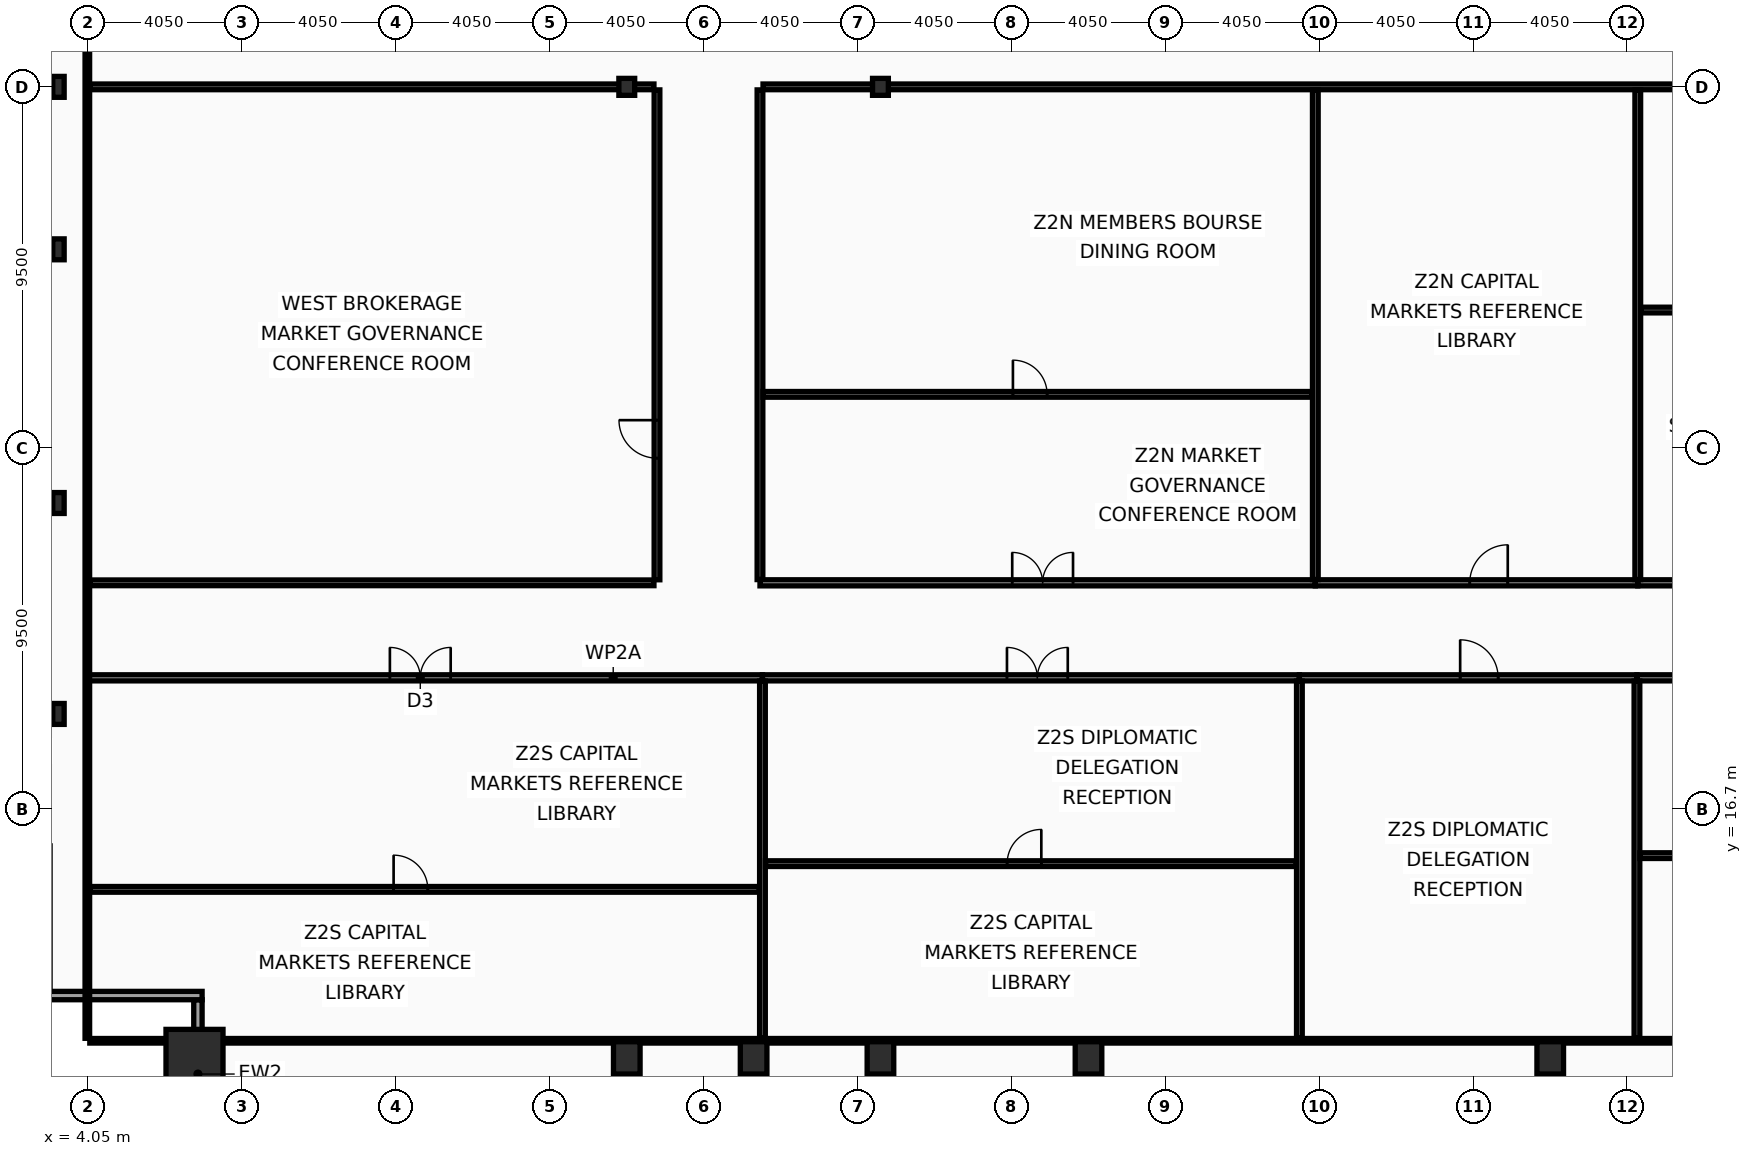
"""IFC4 building model, lengths in metres.
Left out: names, types, materials, properties, quantities, classifications, styles, units other than length and angle.
Written with IfcOpenShell. Run it as: python <this file> out.ifc"""

import sys

from ifc_helpers import new_model, si_unit, direction, frame, frame_2d, origin, origin_2d, place, context, subcontext, project, spatial, rectangle, hollow_rectangle, i_section, extrude, element, fill, save


model = new_model("IFC4")
c1 = context("Model", 3, precision=1e-05, world=origin(), true_north=direction((0.0, 1.0)))
c2 = subcontext(c1, "Body", "Model", "MODEL_VIEW")
j1 = project(units=[si_unit("LENGTHUNIT", "METRE"), si_unit("PLANEANGLEUNIT", "RADIAN")], contexts=[c1])
p1 = place(None, origin())
s1 = spatial("IfcSite", under=j1, at=p1, CompositionType="ELEMENT")
p2 = place(p1, origin())
s2 = spatial("IfcBuilding", under=s1, at=p2, CompositionType="ELEMENT")
p3 = place(p2, frame((0.0, 0.0, 118.2)))
s3 = spatial("IfcBuildingStorey", under=s2, at=p3, CompositionType="ELEMENT", Elevation=118.2)
p4 = place(p3, frame((6.85, 10.15, 0.0), z_axis=(0.0, 0.0, 1.0), x_axis=(1.0, 0.0, 0.0)))
e1 = element("IfcColumn", 1, at=p4, inside=s3, PredefinedType="COLUMN", context=c2, shape_type="SweptSolid", body=[
    extrude(hollow_rectangle(XDim=1.5, YDim=1.5, WallThickness=0.07, at=origin_2d()), origin(), (0.0, 0.0, 1.0), 3.6),
])
for number, where, z_axis, x_axis in (
    (2, (18.225, 10.15, 0.0), (0.0, 0.0, 1.0), (1.0, 0.0, 0.0)),
    (3, (21.562, 10.15, 0.0), (0.0, 0.0, 1.0), (1.0, 0.0, 0.0)),
    (4, (24.9, 10.15, 0.0), (0.0, 0.0, 1.0), (1.0, 0.0, 0.0)),
    (5, (30.375, 10.15, 0.0), (0.0, 0.0, 1.0), (1.0, 0.0, 0.0)),
    (6, (42.525, 10.15, 0.0), (0.0, 0.0, 1.0), (1.0, 0.0, 0.0)),
):
    element("IfcColumn", number, at=place(p3, frame(where, z_axis=z_axis, x_axis=x_axis)), inside=s3, PredefinedType="COLUMN", context=c2, shape_type="SweptSolid", body=[
        extrude(hollow_rectangle(XDim=0.7, YDim=0.85, WallThickness=0.05, at=origin_2d()), origin(), (0.0, 0.0, 1.0), 3.6),
    ])
for number, where, z_axis, x_axis in (
    (7, (3.27, 19.2, 0.0), (0.0, 0.0, 1.0), (1.0, 0.0, 0.0)),
    (8, (3.27, 24.75, 0.0), (0.0, 0.0, 1.0), (1.0, 0.0, 0.0)),
    (9, (3.27, 31.425, 0.0), (0.0, 0.0, 1.0), (1.0, 0.0, 0.0)),
    (10, (3.27, 35.7, 0.0), (0.0, 0.0, 1.0), (1.0, 0.0, 0.0)),
):
    element("IfcColumn", number, at=place(p3, frame(where, z_axis=z_axis, x_axis=x_axis)), inside=s3, PredefinedType="COLUMN", context=c2, shape_type="SweptSolid", body=[
        extrude(i_section(OverallWidth=0.3, OverallDepth=0.55, WebThickness=0.015, FlangeThickness=0.029, at=origin_2d()), origin(), (0.0, 0.0, 1.0), 3.6),
    ])
for number, where, z_axis, x_axis in (
    (11, (18.225, 35.7, 0.0), (0.0, 0.0, 1.0), (1.0, 0.0, 0.0)),
    (12, (24.9, 35.7, 0.0), (0.0, 0.0, 1.0), (1.0, 0.0, 0.0)),
):
    element("IfcColumn", number, at=place(p3, frame(where, z_axis=z_axis, x_axis=x_axis)), inside=s3, PredefinedType="COLUMN", context=c2, shape_type="SweptSolid", body=[
        extrude(i_section(OverallWidth=0.416, OverallDepth=0.446, WebThickness=0.039, FlangeThickness=0.063, at=origin_2d()), origin(), (0.0, 0.0, 1.0), 3.6),
    ])
p5 = place(p3, frame((6.94, 7.77, 0.0), z_axis=(0.0, 0.0, 1.0), x_axis=(0.0, 1.0, 0.0)))
e13 = element("IfcWall", 13, at=p5, inside=s3, PredefinedType="SOLIDWALL", context=c2, shape_type="SweptSolid", body=[
    extrude(rectangle(XDim=3.91, YDim=0.22, at=frame_2d((1.955, 0.0))), origin(), (0.0, 0.0, 1.0), 2.83),
])
p6 = place(p3, frame((7.05, 11.79, 0.0), z_axis=(0.0, 0.0, 1.0), x_axis=(-1.0, 0.0, 0.0)))
e14 = element("IfcWall", 14, at=p6, inside=s3, PredefinedType="SOLIDWALL", context=c2, shape_type="SweptSolid", body=[
    extrude(rectangle(XDim=4.22, YDim=0.22, at=frame_2d((2.11, 0.0))), origin(), (0.0, 0.0, 1.0), 2.83),
])
p7 = place(p3, frame((4.03, 20.15, 0.0), z_axis=(0.0, 0.0, 1.0), x_axis=(1.0, 0.0, 0.0)))
e15 = element("IfcWall", 15, at=p7, inside=s3, PredefinedType="PARTITIONING", context=c2, shape_type="SweptSolid", body=[
    extrude(rectangle(XDim=17.765, YDim=0.16, at=frame_2d((8.883, 0.0))), origin(), (0.0, 0.0, 1.0), 2.73),
])
p8 = place(p7, frame((7.961, 0.0, 0.0)))
e16 = element("IfcOpeningElement", 16, at=p8, cuts=e15, PredefinedType="OPENING", context=c2, shape_type="SweptSolid", body=[
    extrude(rectangle(XDim=1.6, YDim=2.15, at=frame_2d((0.8, 1.075))), frame((0.0, 0.09, 0.0), z_axis=(0.0, -1.0, 0.0), x_axis=(1.0, 0.0, 0.0)), (0.0, 0.0, 1.0), 0.18),
])
p9 = place(p3, frame((4.095, 14.584, 0.0), z_axis=(0.0, 0.0, 1.0), x_axis=(1.0, 0.0, 0.0)))
e17 = element("IfcWall", 17, at=p9, inside=s3, PredefinedType="PARTITIONING", context=c2, shape_type="SweptSolid", body=[
    extrude(rectangle(XDim=17.62, YDim=0.15, at=frame_2d((8.81, 0.0))), origin(), (0.0, 0.0, 1.0), 2.73),
])
p10 = place(p9, frame((7.994, 0.0, 0.0)))
e18 = element("IfcOpeningElement", 18, at=p10, cuts=e17, PredefinedType="OPENING", context=c2, shape_type="SweptSolid", body=[
    extrude(rectangle(XDim=0.9, YDim=2.05, at=frame_2d((0.45, 1.025))), frame((0.0, 0.085, 0.0), z_axis=(0.0, -1.0, 0.0), x_axis=(1.0, 0.0, 0.0)), (0.0, 0.0, 1.0), 0.17),
])
p11 = place(p3, frame((21.795, 20.15, 0.0), z_axis=(0.0, 0.0, 1.0), x_axis=(1.0, 0.0, 0.0)))
e19 = element("IfcWall", 19, at=p11, inside=s3, PredefinedType="PARTITIONING", context=c2, shape_type="SweptSolid", body=[
    extrude(rectangle(XDim=14.129, YDim=0.16, at=frame_2d((7.064, 0.0))), origin(), (0.0, 0.0, 1.0), 2.73),
])
p12 = place(p11, frame((6.434, 0.0, 0.0)))
e20 = element("IfcOpeningElement", 20, at=p12, cuts=e19, PredefinedType="OPENING", context=c2, shape_type="SweptSolid", body=[
    extrude(rectangle(XDim=1.6, YDim=2.15, at=frame_2d((0.8, 1.075))), frame((0.0, 0.09, 0.0), z_axis=(0.0, -1.0, 0.0), x_axis=(1.0, 0.0, 0.0)), (0.0, 0.0, 1.0), 0.18),
])
p13 = place(p3, frame((21.795, 10.665, 0.0), z_axis=(0.0, 0.0, 1.0), x_axis=(0.0, 1.0, 0.0)))
e21 = element("IfcWall", 21, at=p13, inside=s3, PredefinedType="PARTITIONING", context=c2, shape_type="SweptSolid", body=[
    extrude(rectangle(XDim=9.4, YDim=0.15, at=frame_2d((4.7, 0.0))), origin(), (0.0, 0.0, 1.0), 2.88),
])
p14 = place(p3, frame((21.875, 15.261, 0.0), z_axis=(0.0, 0.0, 1.0), x_axis=(1.0, 0.0, 0.0)))
e22 = element("IfcWall", 22, at=p14, inside=s3, PredefinedType="PARTITIONING", context=c2, shape_type="SweptSolid", body=[
    extrude(rectangle(XDim=13.969, YDim=0.15, at=frame_2d((6.984, 0.0))), origin(), (0.0, 0.0, 1.0), 2.73),
])
p15 = place(p14, frame((6.358, 0.0, 0.0)))
e23 = element("IfcOpeningElement", 23, at=p15, cuts=e22, PredefinedType="OPENING", context=c2, shape_type="SweptSolid", body=[
    extrude(rectangle(XDim=0.9, YDim=2.05, at=frame_2d((0.45, 1.025))), frame((0.0, 0.085, 0.0), z_axis=(0.0, -1.0, 0.0), x_axis=(1.0, 0.0, 0.0)), (0.0, 0.0, 1.0), 0.17),
])
p16 = place(p3, frame((35.924, 20.15, 0.0), z_axis=(0.0, 0.0, 1.0), x_axis=(1.0, 0.0, 0.0)))
e24 = element("IfcWall", 24, at=p16, inside=s3, PredefinedType="PARTITIONING", context=c2, shape_type="SweptSolid", body=[
    extrude(rectangle(XDim=8.883, YDim=0.16, at=frame_2d((4.441, 0.0))), origin(), (0.0, 0.0, 1.0), 2.73),
])
p17 = place(p16, frame((4.231, 0.0, 0.0)))
e25 = element("IfcOpeningElement", 25, at=p17, cuts=e24, PredefinedType="OPENING", context=c2, shape_type="SweptSolid", body=[
    extrude(rectangle(XDim=1.0, YDim=2.05, at=frame_2d((0.5, 1.025))), frame((0.0, 0.09, 0.0), z_axis=(0.0, -1.0, 0.0), x_axis=(1.0, 0.0, 0.0)), (0.0, 0.0, 1.0), 0.18),
])
p18 = place(p3, frame((35.924, 10.665, 0.0), z_axis=(0.0, 0.0, 1.0), x_axis=(0.0, 1.0, 0.0)))
e26 = element("IfcWall", 26, at=p18, inside=s3, PredefinedType="PARTITIONING", context=c2, shape_type="SweptSolid", body=[
    extrude(rectangle(XDim=9.4, YDim=0.15, at=frame_2d((4.7, 0.0))), origin(), (0.0, 0.0, 1.0), 2.88),
])
p19 = place(p3, frame((44.807, 20.15, 0.0), z_axis=(0.0, 0.0, 1.0), x_axis=(1.0, 0.0, 0.0)))
e27 = element("IfcWall", 27, at=p19, inside=s3, PredefinedType="PARTITIONING", context=c2, shape_type="SweptSolid", body=[
    extrude(rectangle(XDim=11.727, YDim=0.16, at=frame_2d((5.863, 0.0))), origin(), (0.0, 0.0, 1.0), 2.73),
])
p20 = place(p19, frame((5.425, 0.0, 0.0)))
e28 = element("IfcOpeningElement", 28, at=p20, cuts=e27, PredefinedType="OPENING", context=c2, shape_type="SweptSolid", body=[
    extrude(rectangle(XDim=1.0, YDim=2.05, at=frame_2d((0.5, 1.025))), frame((0.0, 0.09, 0.0), z_axis=(0.0, -1.0, 0.0), x_axis=(1.0, 0.0, 0.0)), (0.0, 0.0, 1.0), 0.18),
])
p21 = place(p3, frame((44.807, 10.665, 0.0), z_axis=(0.0, 0.0, 1.0), x_axis=(0.0, 1.0, 0.0)))
e29 = element("IfcWall", 29, at=p21, inside=s3, PredefinedType="PARTITIONING", context=c2, shape_type="SweptSolid", body=[
    extrude(rectangle(XDim=9.4, YDim=0.15, at=frame_2d((4.7, 0.0))), origin(), (0.0, 0.0, 1.0), 2.88),
])
p22 = place(p3, frame((44.887, 15.472, 0.0), z_axis=(0.0, 0.0, 1.0), x_axis=(1.0, 0.0, 0.0)))
e30 = element("IfcWall", 30, at=p22, inside=s3, PredefinedType="PARTITIONING", context=c2, shape_type="SweptSolid", body=[
    extrude(rectangle(XDim=11.566, YDim=0.15, at=frame_2d((5.783, 0.0))), origin(), (0.0, 0.0, 1.0), 2.73),
])
p23 = place(p22, frame((5.277, 0.0, 0.0)))
e31 = element("IfcOpeningElement", 31, at=p23, cuts=e30, PredefinedType="OPENING", context=c2, shape_type="SweptSolid", body=[
    extrude(rectangle(XDim=0.9, YDim=2.05, at=frame_2d((0.45, 1.025))), frame((0.0, 0.085, 0.0), z_axis=(0.0, -1.0, 0.0), x_axis=(1.0, 0.0, 0.0)), (0.0, 0.0, 1.0), 0.17),
])
p24 = place(p3, frame((19.02, 22.73, 0.0), z_axis=(0.0, 0.0, 1.0), x_axis=(0.0, 1.0, 0.0)))
e32 = element("IfcWall", 32, at=p24, inside=s3, PredefinedType="PARTITIONING", context=c2, shape_type="SweptSolid", body=[
    extrude(rectangle(XDim=12.89, YDim=0.15, at=frame_2d((6.445, 0.0))), origin(), (0.0, 0.0, 1.0), 2.88),
])
p25 = place(p24, frame((3.2, 0.0, 0.0)))
e33 = element("IfcOpeningElement", 33, at=p25, cuts=e32, PredefinedType="OPENING", context=c2, shape_type="SweptSolid", body=[
    extrude(rectangle(XDim=1.0, YDim=2.05, at=frame_2d((0.5, 1.025))), frame((0.0, 0.085, 0.0), z_axis=(0.0, -1.0, 0.0), x_axis=(1.0, 0.0, 0.0)), (0.0, 0.0, 1.0), 0.17),
])
for number, where, z_axis, x_axis in (
    (34, (4.095, 22.65, 0.0), (0.0, 0.0, 1.0), (1.0, 0.0, 0.0)),
    (35, (4.095, 35.7, 0.0), (0.0, 0.0, 1.0), (1.0, 0.0, 0.0)),
):
    element("IfcWall", number, at=place(p3, frame(where, z_axis=z_axis, x_axis=x_axis)), inside=s3, PredefinedType="PARTITIONING", context=c2, shape_type="SweptSolid", body=[
        extrude(rectangle(XDim=14.845, YDim=0.15, at=frame_2d((7.422, 0.0))), origin(), (0.0, 0.0, 1.0), 2.73),
    ])
p26 = place(p3, frame((21.73, 22.735, 0.0), z_axis=(0.0, 0.0, 1.0), x_axis=(0.0, 1.0, 0.0)))
e36 = element("IfcWall", 36, at=p26, inside=s3, PredefinedType="PARTITIONING", context=c2, shape_type="SweptSolid", body=[
    extrude(rectangle(XDim=12.885, YDim=0.15, at=frame_2d((6.442, 0.0))), origin(), (0.0, 0.0, 1.0), 2.88),
])
p27 = place(p3, frame((21.81, 35.7, 0.0), z_axis=(0.0, 0.0, 1.0), x_axis=(1.0, 0.0, 0.0)))
e37 = element("IfcWall", 37, at=p27, inside=s3, PredefinedType="PARTITIONING", context=c2, shape_type="SweptSolid", body=[
    extrude(rectangle(XDim=46.995, YDim=0.15, at=frame_2d((23.498, 0.0))), origin(), (0.0, 0.0, 1.0), 2.73),
])
p28 = place(p3, frame((21.73, 22.65, 0.0), z_axis=(0.0, 0.0, 1.0), x_axis=(1.0, 0.0, 0.0)))
e38 = element("IfcWall", 38, at=p28, inside=s3, PredefinedType="PARTITIONING", context=c2, shape_type="SweptSolid", body=[
    extrude(rectangle(XDim=14.614, YDim=0.16, at=frame_2d((7.307, 0.0))), origin(), (0.0, 0.0, 1.0), 2.73),
])
p29 = place(p28, frame((6.638, 0.0, 0.0)))
e39 = element("IfcOpeningElement", 39, at=p29, cuts=e38, PredefinedType="OPENING", context=c2, shape_type="SweptSolid", body=[
    extrude(rectangle(XDim=1.6, YDim=2.15, at=frame_2d((0.8, 1.075))), frame((0.0, 0.09, 0.0), z_axis=(0.0, -1.0, 0.0), x_axis=(1.0, 0.0, 0.0)), (0.0, 0.0, 1.0), 0.18),
])
p30 = place(p3, frame((21.81, 27.609, 0.0), z_axis=(0.0, 0.0, 1.0), x_axis=(1.0, 0.0, 0.0)))
e40 = element("IfcWall", 40, at=p30, inside=s3, PredefinedType="PARTITIONING", context=c2, shape_type="SweptSolid", body=[
    extrude(rectangle(XDim=14.453, YDim=0.15, at=frame_2d((7.227, 0.0))), origin(), (0.0, 0.0, 1.0), 2.73),
])
p31 = place(p30, frame((6.576, 0.0, 0.0)))
e41 = element("IfcOpeningElement", 41, at=p31, cuts=e40, PredefinedType="OPENING", context=c2, shape_type="SweptSolid", body=[
    extrude(rectangle(XDim=0.9, YDim=2.05, at=frame_2d((0.45, 1.025))), frame((0.0, 0.085, 0.0), z_axis=(0.0, -1.0, 0.0), x_axis=(1.0, 0.0, 0.0)), (0.0, 0.0, 1.0), 0.17),
])
p32 = place(p3, frame((36.344, 22.65, 0.0), z_axis=(0.0, 0.0, 1.0), x_axis=(1.0, 0.0, 0.0)))
e42 = element("IfcWall", 42, at=p32, inside=s3, PredefinedType="PARTITIONING", context=c2, shape_type="SweptSolid", body=[
    extrude(rectangle(XDim=8.485, YDim=0.16, at=frame_2d((4.243, 0.0))), origin(), (0.0, 0.0, 1.0), 2.73),
])
p33 = place(p32, frame((4.064, 0.0, 0.0)))
e43 = element("IfcOpeningElement", 43, at=p33, cuts=e42, PredefinedType="OPENING", context=c2, shape_type="SweptSolid", body=[
    extrude(rectangle(XDim=1.0, YDim=2.05, at=frame_2d((0.5, 1.025))), frame((0.0, 0.09, 0.0), z_axis=(0.0, -1.0, 0.0), x_axis=(1.0, 0.0, 0.0)), (0.0, 0.0, 1.0), 0.18),
])
p34 = place(p3, frame((36.344, 22.735, 0.0), z_axis=(0.0, 0.0, 1.0), x_axis=(0.0, 1.0, 0.0)))
e44 = element("IfcWall", 44, at=p34, inside=s3, PredefinedType="PARTITIONING", context=c2, shape_type="SweptSolid", body=[
    extrude(rectangle(XDim=12.885, YDim=0.15, at=frame_2d((6.442, 0.0))), origin(), (0.0, 0.0, 1.0), 2.88),
])
p35 = place(p3, frame((44.829, 22.65, 0.0), z_axis=(0.0, 0.0, 1.0), x_axis=(1.0, 0.0, 0.0)))
e45 = element("IfcWall", 45, at=p35, inside=s3, PredefinedType="PARTITIONING", context=c2, shape_type="SweptSolid", body=[
    extrude(rectangle(XDim=8.014, YDim=0.16, at=frame_2d((4.007, 0.0))), origin(), (0.0, 0.0, 1.0), 2.73),
])
p36 = place(p35, frame((3.866, 0.0, 0.0)))
e46 = element("IfcOpeningElement", 46, at=p36, cuts=e45, PredefinedType="OPENING", context=c2, shape_type="SweptSolid", body=[
    extrude(rectangle(XDim=1.0, YDim=2.05, at=frame_2d((0.5, 1.025))), frame((0.0, 0.09, 0.0), z_axis=(0.0, -1.0, 0.0), x_axis=(1.0, 0.0, 0.0)), (0.0, 0.0, 1.0), 0.18),
])
p37 = place(p3, frame((44.829, 22.735, 0.0), z_axis=(0.0, 0.0, 1.0), x_axis=(0.0, 1.0, 0.0)))
e47 = element("IfcWall", 47, at=p37, inside=s3, PredefinedType="PARTITIONING", context=c2, shape_type="SweptSolid", body=[
    extrude(rectangle(XDim=12.885, YDim=0.15, at=frame_2d((6.442, 0.0))), origin(), (0.0, 0.0, 1.0), 2.88),
])
p38 = place(p3, frame((44.909, 29.827, 0.0), z_axis=(0.0, 0.0, 1.0), x_axis=(1.0, 0.0, 0.0)))
e48 = element("IfcWall", 48, at=p38, inside=s3, PredefinedType="PARTITIONING", context=c2, shape_type="SweptSolid", body=[
    extrude(rectangle(XDim=7.854, YDim=0.15, at=frame_2d((3.927, 0.0))), origin(), (0.0, 0.0, 1.0), 2.73),
])
p39 = place(p38, frame((3.606, 0.0, 0.0)))
e49 = element("IfcOpeningElement", 49, at=p39, cuts=e48, PredefinedType="OPENING", context=c2, shape_type="SweptSolid", body=[
    extrude(rectangle(XDim=0.9, YDim=2.05, at=frame_2d((0.45, 1.025))), frame((0.0, 0.085, 0.0), z_axis=(0.0, -1.0, 0.0), x_axis=(1.0, 0.0, 0.0)), (0.0, 0.0, 1.0), 0.17),
])
p40 = place(p3, frame((4.03, 10.665, 0.0), z_axis=(0.0, 0.0, 1.0), x_axis=(0.0, 1.0, 0.0)))
e50 = element("IfcWall", 50, at=p40, inside=s3, PredefinedType="PARTITIONING", context=c2, shape_type="SweptSolid", body=[
    extrude(rectangle(XDim=42.11, YDim=0.12, at=frame_2d((21.055, 0.0))), origin(), (0.0, 0.0, 1.0), 2.73),
])
p41 = place(p3, frame((4.095, 10.6, 0.0), z_axis=(0.0, 0.0, 1.0), x_axis=(1.0, 0.0, 0.0)))
e51 = element("IfcWall", 51, at=p41, inside=s3, PredefinedType="PARTITIONING", context=c2, shape_type="SweptSolid", body=[
    extrude(rectangle(XDim=64.71, YDim=0.12, at=frame_2d((32.355, 0.0))), origin(), (0.0, 0.0, 1.0), 2.73),
])
p42 = place(p8, origin())
e52 = element("IfcDoor", 52, at=p42, inside=s3, OperationType="DOUBLE_DOOR_SINGLE_SWING", PredefinedType="DOOR", context=c2, shape_type="SweptSolid", body=[
    extrude(rectangle(XDim=1.6, YDim=2.15, at=frame_2d((0.8, 1.075))), frame((0.0, 0.025, 0.0), z_axis=(0.0, -1.0, 0.0), x_axis=(1.0, 0.0, 0.0)), (0.0, 0.0, 1.0), 0.05),
])
fill(e16, e52)
p43 = place(p10, origin())
e53 = element("IfcDoor", 53, at=p43, inside=s3, OperationType="SINGLE_SWING_LEFT", PredefinedType="DOOR", context=c2, shape_type="SweptSolid", body=[
    extrude(rectangle(XDim=0.9, YDim=2.05, at=frame_2d((0.45, 1.025))), frame((0.0, 0.025, 0.0), z_axis=(0.0, -1.0, 0.0), x_axis=(1.0, 0.0, 0.0)), (0.0, 0.0, 1.0), 0.05),
])
fill(e18, e53)
p44 = place(p12, origin())
e54 = element("IfcDoor", 54, at=p44, inside=s3, OperationType="DOUBLE_DOOR_SINGLE_SWING", PredefinedType="DOOR", context=c2, shape_type="SweptSolid", body=[
    extrude(rectangle(XDim=1.6, YDim=2.15, at=frame_2d((0.8, 1.075))), frame((0.0, 0.025, 0.0), z_axis=(0.0, -1.0, 0.0), x_axis=(1.0, 0.0, 0.0)), (0.0, 0.0, 1.0), 0.05),
])
fill(e20, e54)
p45 = place(p15, origin())
e55 = element("IfcDoor", 55, at=p45, inside=s3, OperationType="SINGLE_SWING_RIGHT", PredefinedType="DOOR", context=c2, shape_type="SweptSolid", body=[
    extrude(rectangle(XDim=0.9, YDim=2.05, at=frame_2d((0.45, 1.025))), frame((0.0, 0.025, 0.0), z_axis=(0.0, -1.0, 0.0), x_axis=(1.0, 0.0, 0.0)), (0.0, 0.0, 1.0), 0.05),
])
fill(e23, e55)
p46 = place(p17, origin())
e56 = element("IfcDoor", 56, at=p46, inside=s3, OperationType="SINGLE_SWING_LEFT", PredefinedType="DOOR", context=c2, shape_type="SweptSolid", body=[
    extrude(rectangle(XDim=1.0, YDim=2.05, at=frame_2d((0.5, 1.025))), frame((0.0, 0.025, 0.0), z_axis=(0.0, -1.0, 0.0), x_axis=(1.0, 0.0, 0.0)), (0.0, 0.0, 1.0), 0.05),
])
fill(e25, e56)
p47 = place(p25, origin())
e57 = element("IfcDoor", 57, at=p47, inside=s3, OperationType="SINGLE_SWING_RIGHT", PredefinedType="DOOR", context=c2, shape_type="SweptSolid", body=[
    extrude(rectangle(XDim=1.0, YDim=2.05, at=frame_2d((0.5, 1.025))), frame((0.0, 0.025, 0.0), z_axis=(0.0, -1.0, 0.0), x_axis=(1.0, 0.0, 0.0)), (0.0, 0.0, 1.0), 0.05),
])
fill(e33, e57)
p48 = place(p29, origin())
e58 = element("IfcDoor", 58, at=p48, inside=s3, OperationType="DOUBLE_DOOR_SINGLE_SWING", PredefinedType="DOOR", context=c2, shape_type="SweptSolid", body=[
    extrude(rectangle(XDim=1.6, YDim=2.15, at=frame_2d((0.8, 1.075))), frame((0.0, 0.025, 0.0), z_axis=(0.0, -1.0, 0.0), x_axis=(1.0, 0.0, 0.0)), (0.0, 0.0, 1.0), 0.05),
])
fill(e39, e58)
p49 = place(p31, origin())
e59 = element("IfcDoor", 59, at=p49, inside=s3, OperationType="SINGLE_SWING_LEFT", PredefinedType="DOOR", context=c2, shape_type="SweptSolid", body=[
    extrude(rectangle(XDim=0.9, YDim=2.05, at=frame_2d((0.45, 1.025))), frame((0.0, 0.025, 0.0), z_axis=(0.0, -1.0, 0.0), x_axis=(1.0, 0.0, 0.0)), (0.0, 0.0, 1.0), 0.05),
])
fill(e41, e59)
p50 = place(p33, origin())
e60 = element("IfcDoor", 60, at=p50, inside=s3, OperationType="SINGLE_SWING_RIGHT", PredefinedType="DOOR", context=c2, shape_type="SweptSolid", body=[
    extrude(rectangle(XDim=1.0, YDim=2.05, at=frame_2d((0.5, 1.025))), frame((0.0, 0.025, 0.0), z_axis=(0.0, -1.0, 0.0), x_axis=(1.0, 0.0, 0.0)), (0.0, 0.0, 1.0), 0.05),
])
fill(e43, e60)
save(model, sys.argv[1])
